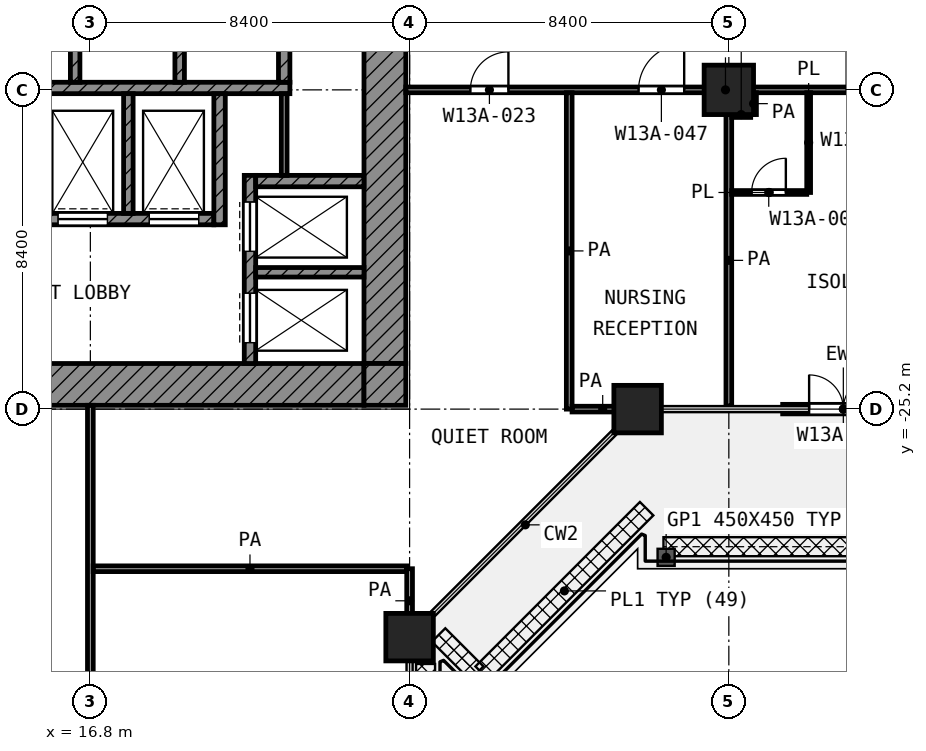
"""IFC4 building model, lengths in metres.
Left out: names, types, materials, properties, quantities, classifications, styles, units other than length and angle.
Written with IfcOpenShell. Run it as: python <this file> out.ifc"""

import sys

from ifc_helpers import new_model, si_unit, direction, frame, frame_2d, origin, origin_2d, place, context, subcontext, project, spatial, rectangle, extrude, element, fill, save


model = new_model("IFC4")
c1 = context("Model", 3, precision=1e-05, world=origin(), true_north=direction((0.0, 1.0)))
c2 = subcontext(c1, "Body", "Model", "MODEL_VIEW")
j1 = project(units=[si_unit("LENGTHUNIT", "METRE"), si_unit("PLANEANGLEUNIT", "RADIAN")], contexts=[c1])
p1 = place(None, origin())
s1 = spatial("IfcSite", under=j1, at=p1, CompositionType="ELEMENT")
p2 = place(p1, origin())
s2 = spatial("IfcBuilding", under=s1, at=p2, CompositionType="ELEMENT")
p3 = place(p2, frame((0.0, 0.0, 60.2)))
s3 = spatial("IfcBuildingStorey", under=s2, at=p3, CompositionType="ELEMENT", Elevation=60.2)
p4 = place(p3, frame((33.6, -16.8, 0.0), z_axis=(0.0, 0.0, 1.0), x_axis=(1.0, 0.0, 0.0)))
e1 = element("IfcColumn", 1, at=p4, inside=s3, PredefinedType="COLUMN", context=c2, shape_type="SweptSolid", body=[
    extrude(rectangle(XDim=1.3, YDim=1.3, at=origin_2d()), origin(), (0.0, 0.0, 1.0), 4.2),
])
for number, where, z_axis, x_axis in (
    (2, (31.2, -25.2, 0.0), (0.0, 0.0, 1.0), (1.0, 0.0, 0.0)),
    (3, (25.2, -31.2, 0.0), (0.0, 0.0, 1.0), (1.0, 0.0, 0.0)),
):
    element("IfcColumn", number, at=place(p3, frame(where, z_axis=z_axis, x_axis=x_axis)), inside=s3, PredefinedType="COLUMN", context=c2, shape_type="SweptSolid", body=[
        extrude(rectangle(XDim=1.25, YDim=1.25, at=origin_2d()), origin(), (0.0, 0.0, 1.0), 4.2),
    ])
p5 = place(p3, frame((35.017, -25.2, 0.0), z_axis=(0.0, 0.0, 1.0), x_axis=(1.0, 0.0, 0.0)))
e4 = element("IfcWall", 4, at=p5, inside=s3, PredefinedType="SOLIDWALL", context=c2, shape_type="SweptSolid", body=[
    extrude(rectangle(XDim=3.192, YDim=0.25, at=frame_2d((1.596, 0.0))), origin(), (0.0, 0.0, 1.0), 3.78),
])
p6 = place(p5, frame((0.696, 0.0, 0.0)))
e5 = element("IfcOpeningElement", 5, at=p6, cuts=e4, PredefinedType="OPENING", context=c2, shape_type="SweptSolid", body=[
    extrude(rectangle(XDim=1.8, YDim=2.1, at=frame_2d((0.9, 1.05))), frame((0.0, 0.135, 0.0), z_axis=(0.0, -1.0, 0.0), x_axis=(1.0, 0.0, 0.0)), (0.0, 0.0, 1.0), 0.27),
])
p7 = place(p3, frame((24.55, -24.0, 0.0), z_axis=(0.0, 0.0, 1.0), x_axis=(0.0, 1.0, 0.0)))
e6 = element("IfcWall", 6, at=p7, inside=s3, PredefinedType="SHEAR", context=c2, shape_type="SweptSolid", body=[
    extrude(rectangle(XDim=18.6, YDim=1.1, at=frame_2d((9.3, 0.0))), origin(), (0.0, 0.0, 1.0), 3.9),
])
p8 = place(p7, frame((10.5, 0.0, 0.0)))
e7 = element("IfcOpeningElement", 7, at=p8, cuts=e6, PredefinedType="OPENING", context=c2, shape_type="SweptSolid", body=[
    extrude(rectangle(XDim=1.8, YDim=2.1, at=frame_2d((0.9, 1.05))), frame((0.0, 0.56, 0.0), z_axis=(0.0, -1.0, 0.0), x_axis=(1.0, 0.0, 0.0)), (0.0, 0.0, 1.0), 1.12),
])
p9 = place(p3, frame((5.4, -24.55, 0.0), z_axis=(0.0, 0.0, 1.0), x_axis=(1.0, 0.0, 0.0)))
e8 = element("IfcWall", 8, at=p9, inside=s3, PredefinedType="SHEAR", context=c2, shape_type="SweptSolid", body=[
    extrude(rectangle(XDim=18.6, YDim=1.1, at=frame_2d((9.3, 0.0))), origin(), (0.0, 0.0, 1.0), 3.9),
])
p10 = place(p9, frame((6.3, 0.0, 0.0)))
e9 = element("IfcOpeningElement", 9, at=p10, cuts=e8, PredefinedType="OPENING", context=c2, shape_type="SweptSolid", body=[
    extrude(rectangle(XDim=1.8, YDim=2.1, at=frame_2d((0.9, 1.05))), frame((0.0, 0.56, 0.0), z_axis=(0.0, -1.0, 0.0), x_axis=(1.0, 0.0, 0.0)), (0.0, 0.0, 1.0), 1.12),
])
p11 = place(p3, frame((24.55, -25.1, 0.0), z_axis=(0.0, 0.0, 1.0), x_axis=(0.0, 1.0, 0.0)))
e10 = element("IfcWall", 10, at=p11, inside=s3, PredefinedType="SHEAR", context=c2, shape_type="SweptSolid", body=[
    extrude(rectangle(XDim=1.1, YDim=1.1, at=frame_2d((0.55, 0.0))), origin(), (0.0, 0.0, 1.0), 3.9),
])
p12 = place(p3, frame((5.4, -16.75, 0.0), z_axis=(0.0, 0.0, 1.0), x_axis=(1.0, 0.0, 0.0)))
e11 = element("IfcWall", 11, at=p12, inside=s3, PredefinedType="SHEAR", context=c2, shape_type="SweptSolid", body=[
    extrude(rectangle(XDim=16.65, YDim=0.3, at=frame_2d((8.325, 0.0))), origin(), (0.0, 0.0, 1.0), 3.9),
])
p13 = place(p3, frame((5.4, -20.2, 0.0), z_axis=(0.0, 0.0, 1.0), x_axis=(1.0, 0.0, 0.0)))
e12 = element("IfcWall", 12, at=p13, inside=s3, PredefinedType="SHEAR", context=c2, shape_type="SweptSolid", body=[
    extrude(rectangle(XDim=14.65, YDim=0.3, at=frame_2d((7.325, 0.0))), origin(), (0.0, 0.0, 1.0), 3.9),
])
p14 = place(p13, frame((10.55, 0.0, 0.0)))
e13 = element("IfcOpeningElement", 13, at=p14, cuts=e12, PredefinedType="OPENING", context=c2, shape_type="SweptSolid", body=[
    extrude(rectangle(XDim=1.3, YDim=2.1, at=frame_2d((0.65, 1.05))), frame((0.0, 0.16, 0.0), z_axis=(0.0, -1.0, 0.0), x_axis=(1.0, 0.0, 0.0)), (0.0, 0.0, 1.0), 0.32),
])
p15 = place(p13, frame((12.95, 0.0, 0.0)))
e14 = element("IfcOpeningElement", 14, at=p15, cuts=e12, PredefinedType="OPENING", context=c2, shape_type="SweptSolid", body=[
    extrude(rectangle(XDim=1.3, YDim=2.1, at=frame_2d((0.65, 1.05))), frame((0.0, 0.16, 0.0), z_axis=(0.0, -1.0, 0.0), x_axis=(1.0, 0.0, 0.0)), (0.0, 0.0, 1.0), 0.32),
])
p16 = place(p13, frame((0.55, 0.0, 0.0)))
e15 = element("IfcOpeningElement", 15, at=p16, cuts=e12, PredefinedType="OPENING", context=c2, shape_type="SweptSolid", body=[
    extrude(rectangle(XDim=1.3, YDim=2.1, at=frame_2d((0.65, 1.05))), frame((0.0, 0.16, 0.0), z_axis=(0.0, -1.0, 0.0), x_axis=(1.0, 0.0, 0.0)), (0.0, 0.0, 1.0), 0.32),
])
p17 = place(p13, frame((2.95, 0.0, 0.0)))
e16 = element("IfcOpeningElement", 16, at=p17, cuts=e12, PredefinedType="OPENING", context=c2, shape_type="SweptSolid", body=[
    extrude(rectangle(XDim=1.3, YDim=2.1, at=frame_2d((0.65, 1.05))), frame((0.0, 0.16, 0.0), z_axis=(0.0, -1.0, 0.0), x_axis=(1.0, 0.0, 0.0)), (0.0, 0.0, 1.0), 0.32),
])
p18 = place(p13, frame((7.15, 0.0, 0.0)))
e17 = element("IfcOpeningElement", 17, at=p18, cuts=e12, PredefinedType="OPENING", context=c2, shape_type="SweptSolid", body=[
    extrude(rectangle(XDim=0.9, YDim=2.1, at=frame_2d((0.45, 1.05))), frame((0.0, 0.16, 0.0), z_axis=(0.0, -1.0, 0.0), x_axis=(1.0, 0.0, 0.0)), (0.0, 0.0, 1.0), 0.32),
])
p19 = place(p3, frame((20.2, -20.35, 0.0), z_axis=(0.0, 0.0, 1.0), x_axis=(0.0, 1.0, 0.0)))
e18 = element("IfcWall", 18, at=p19, inside=s3, PredefinedType="SHEAR", context=c2, shape_type="SweptSolid", body=[
    extrude(rectangle(XDim=3.45, YDim=0.3, at=frame_2d((1.725, 0.0))), origin(), (0.0, 0.0, 1.0), 3.9),
])
p20 = place(p3, frame((21.9, -16.6, 0.0), z_axis=(0.0, 0.0, 1.0), x_axis=(0.0, 1.0, 0.0)))
e19 = element("IfcWall", 19, at=p20, inside=s3, PredefinedType="SHEAR", context=c2, shape_type="SweptSolid", body=[
    extrude(rectangle(XDim=2.35, YDim=0.3, at=frame_2d((1.175, 0.0))), origin(), (0.0, 0.0, 1.0), 3.9),
])
p21 = place(p3, frame((21.15, -19.2, 0.0), z_axis=(0.0, 0.0, 1.0), x_axis=(1.0, 0.0, 0.0)))
e20 = element("IfcWall", 20, at=p21, inside=s3, PredefinedType="SHEAR", context=c2, shape_type="SweptSolid", body=[
    extrude(rectangle(XDim=2.85, YDim=0.3, at=frame_2d((1.425, 0.0))), origin(), (0.0, 0.0, 1.0), 3.9),
])
p22 = place(p3, frame((21.0, -24.0, 0.0), z_axis=(0.0, 0.0, 1.0), x_axis=(0.0, 1.0, 0.0)))
e21 = element("IfcWall", 21, at=p22, inside=s3, PredefinedType="SHEAR", context=c2, shape_type="SweptSolid", body=[
    extrude(rectangle(XDim=4.95, YDim=0.3, at=frame_2d((2.475, 0.0))), origin(), (0.0, 0.0, 1.0), 3.9),
])
p23 = place(p22, frame((2.95, 0.0, 0.0)))
e22 = element("IfcOpeningElement", 22, at=p23, cuts=e21, PredefinedType="OPENING", context=c2, shape_type="SweptSolid", body=[
    extrude(rectangle(XDim=1.3, YDim=2.1, at=frame_2d((0.65, 1.05))), frame((0.0, 0.16, 0.0), z_axis=(0.0, -1.0, 0.0), x_axis=(1.0, 0.0, 0.0)), (0.0, 0.0, 1.0), 0.32),
])
p24 = place(p22, frame((0.55, 0.0, 0.0)))
e23 = element("IfcOpeningElement", 23, at=p24, cuts=e21, PredefinedType="OPENING", context=c2, shape_type="SweptSolid", body=[
    extrude(rectangle(XDim=1.3, YDim=2.1, at=frame_2d((0.65, 1.05))), frame((0.0, 0.16, 0.0), z_axis=(0.0, -1.0, 0.0), x_axis=(1.0, 0.0, 0.0)), (0.0, 0.0, 1.0), 0.32),
])
p25 = place(p3, frame((21.15, -21.6, 0.0), z_axis=(0.0, 0.0, 1.0), x_axis=(1.0, 0.0, 0.0)))
e24 = element("IfcWall", 24, at=p25, inside=s3, PredefinedType="SHEAR", context=c2, shape_type="SweptSolid", body=[
    extrude(rectangle(XDim=2.85, YDim=0.25, at=frame_2d((1.425, 0.0))), origin(), (0.0, 0.0, 1.0), 3.9),
])
p26 = place(p3, frame((17.8, -20.05, 0.0), z_axis=(0.0, 0.0, 1.0), x_axis=(0.0, 1.0, 0.0)))
e25 = element("IfcWall", 25, at=p26, inside=s3, PredefinedType="SHEAR", context=c2, shape_type="SweptSolid", body=[
    extrude(rectangle(XDim=3.15, YDim=0.25, at=frame_2d((1.575, 0.0))), origin(), (0.0, 0.0, 1.0), 3.9),
])
for number, where, z_axis, x_axis in (
    (26, (16.4, -16.6, 0.0), (0.0, 0.0, 1.0), (0.0, 1.0, 0.0)),
    (27, (19.15, -16.6, 0.0), (0.0, 0.0, 1.0), (0.0, 1.0, 0.0)),
):
    element("IfcWall", number, at=place(p3, frame(where, z_axis=z_axis, x_axis=x_axis)), inside=s3, PredefinedType="SHEAR", context=c2, shape_type="SweptSolid", body=[
        extrude(rectangle(XDim=2.35, YDim=0.25, at=frame_2d((1.175, 0.0))), origin(), (0.0, 0.0, 1.0), 3.9),
    ])
p27 = place(p3, frame((21.9, -19.05, 0.0), z_axis=(0.0, 0.0, 1.0), x_axis=(0.0, 1.0, 0.0)))
e28 = element("IfcWall", 28, at=p27, inside=s3, PredefinedType="PARTITIONING", context=c2, shape_type="SweptSolid", body=[
    extrude(rectangle(XDim=2.15, YDim=0.15, at=frame_2d((1.075, 0.0))), origin(), (0.0, 0.0, 1.0), 3.9),
])
p28 = place(p3, frame((33.675, -19.5, 0.0), z_axis=(0.0, 0.0, 1.0), x_axis=(1.0, 0.0, 0.0)))
e29 = element("IfcWall", 29, at=p28, inside=s3, PredefinedType="PARTITIONING", context=c2, shape_type="SweptSolid", body=[
    extrude(rectangle(XDim=1.975, YDim=0.1, at=frame_2d((0.987, 0.0))), origin(), (0.0, 0.0, 1.0), 3.9),
])
p29 = place(p28, frame((0.525, 0.0, 0.0)))
e30 = element("IfcOpeningElement", 30, at=p29, cuts=e29, PredefinedType="OPENING", context=c2, shape_type="SweptSolid", body=[
    extrude(rectangle(XDim=0.9, YDim=2.1, at=frame_2d((0.45, 1.05))), frame((0.0, 0.06, 0.0), z_axis=(0.0, -1.0, 0.0), x_axis=(1.0, 0.0, 0.0)), (0.0, 0.0, 1.0), 0.12),
])
p30 = place(p3, frame((35.7, -19.5, 0.0), z_axis=(0.0, 0.0, 1.0), x_axis=(0.0, 1.0, 0.0)))
e31 = element("IfcWall", 31, at=p30, inside=s3, PredefinedType="PARTITIONING", context=c2, shape_type="SweptSolid", body=[
    extrude(rectangle(XDim=2.625, YDim=0.1, at=frame_2d((1.312, 0.0))), origin(), (0.0, 0.0, 1.0), 3.9),
])
p31 = place(p3, frame((16.875, -29.4, 0.0), z_axis=(0.0, 0.0, 1.0), x_axis=(1.0, 0.0, 0.0)))
e32 = element("IfcWall", 32, at=p31, inside=s3, PredefinedType="PARTITIONING", context=c2, shape_type="SweptSolid", body=[
    extrude(rectangle(XDim=8.25, YDim=0.15, at=frame_2d((4.125, 0.0))), origin(), (0.0, 0.0, 1.0), 3.9),
])
p32 = place(p3, frame((29.475, -25.2, 0.0), z_axis=(0.0, 0.0, 1.0), x_axis=(1.0, 0.0, 0.0)))
e33 = element("IfcWall", 33, at=p32, inside=s3, PredefinedType="PARTITIONING", context=c2, shape_type="SweptSolid", body=[
    extrude(rectangle(XDim=1.612, YDim=0.15, at=frame_2d((0.806, 0.0))), origin(), (0.0, 0.0, 1.0), 3.9),
])
p33 = place(p3, frame((33.677, -17.45, 0.0), z_axis=(0.0, 0.0, 1.0), x_axis=(1.0, 0.0, 0.0)))
e34 = element("IfcWall", 34, at=p33, inside=s3, PredefinedType="PARTITIONING", context=c2, shape_type="SweptSolid", body=[
    extrude(rectangle(XDim=0.498, YDim=0.15, at=frame_2d((0.249, 0.0))), origin(), (0.0, 0.0, 1.0), 3.9),
])
p34 = place(p3, frame((25.1, -16.8, 0.0), z_axis=(0.0, 0.0, 1.0), x_axis=(1.0, 0.0, 0.0)))
e35 = element("IfcWall", 35, at=p34, inside=s3, PredefinedType="PARTITIONING", context=c2, shape_type="SweptSolid", body=[
    extrude(rectangle(XDim=16.823, YDim=0.15, at=frame_2d((8.412, 0.0))), origin(), (0.0, 0.0, 1.0), 3.9),
])
p35 = place(p34, frame((1.7, 0.0, 0.0)))
e36 = element("IfcOpeningElement", 36, at=p35, cuts=e35, PredefinedType="OPENING", context=c2, shape_type="SweptSolid", body=[
    extrude(rectangle(XDim=1.0, YDim=2.1, at=frame_2d((0.5, 1.05))), frame((0.0, 0.085, 0.0), z_axis=(0.0, -1.0, 0.0), x_axis=(1.0, 0.0, 0.0)), (0.0, 0.0, 1.0), 0.17),
])
p36 = place(p34, frame((6.125, 0.0, 0.0)))
e37 = element("IfcOpeningElement", 37, at=p36, cuts=e35, PredefinedType="OPENING", context=c2, shape_type="SweptSolid", body=[
    extrude(rectangle(XDim=1.2, YDim=2.1, at=frame_2d((0.6, 1.05))), frame((0.0, 0.085, 0.0), z_axis=(0.0, -1.0, 0.0), x_axis=(1.0, 0.0, 0.0)), (0.0, 0.0, 1.0), 0.17),
])
p37 = place(p34, frame((13.15, 0.0, 0.0)))
e38 = element("IfcOpeningElement", 38, at=p37, cuts=e35, PredefinedType="OPENING", context=c2, shape_type="SweptSolid", body=[
    extrude(rectangle(XDim=1.2, YDim=2.1, at=frame_2d((0.6, 1.05))), frame((0.0, 0.085, 0.0), z_axis=(0.0, -1.0, 0.0), x_axis=(1.0, 0.0, 0.0)), (0.0, 0.0, 1.0), 0.17),
])
p38 = place(p34, frame((11.6, 0.0, 0.0)))
e39 = element("IfcOpeningElement", 39, at=p38, cuts=e35, PredefinedType="OPENING", context=c2, shape_type="SweptSolid", body=[
    extrude(rectangle(XDim=1.2, YDim=2.1, at=frame_2d((0.6, 1.05))), frame((0.0, 0.085, 0.0), z_axis=(0.0, -1.0, 0.0), x_axis=(1.0, 0.0, 0.0)), (0.0, 0.0, 1.0), 0.17),
])
p39 = place(p34, frame((15.0, 0.0, 0.0)))
e40 = element("IfcOpeningElement", 40, at=p39, cuts=e35, PredefinedType="OPENING", context=c2, shape_type="SweptSolid", body=[
    extrude(rectangle(XDim=1.2, YDim=2.1, at=frame_2d((0.6, 1.05))), frame((0.0, 0.085, 0.0), z_axis=(0.0, -1.0, 0.0), x_axis=(1.0, 0.0, 0.0)), (0.0, 0.0, 1.0), 0.17),
])
p40 = place(p3, frame((16.8, -58.798, 0.0), z_axis=(0.0, 0.0, 1.0), x_axis=(0.0, 1.0, 0.0)))
e41 = element("IfcWall", 41, at=p40, inside=s3, PredefinedType="PARTITIONING", context=c2, shape_type="SweptSolid", body=[
    extrude(rectangle(XDim=33.698, YDim=0.15, at=frame_2d((16.849, 0.0))), origin(), (0.0, 0.0, 1.0), 3.9),
])
p41 = place(p40, frame((23.298, 0.0, 0.0)))
e42 = element("IfcOpeningElement", 42, at=p41, cuts=e41, PredefinedType="OPENING", context=c2, shape_type="SweptSolid", body=[
    extrude(rectangle(XDim=1.2, YDim=2.1, at=frame_2d((0.6, 1.05))), frame((0.0, 0.085, 0.0), z_axis=(0.0, -1.0, 0.0), x_axis=(1.0, 0.0, 0.0)), (0.0, 0.0, 1.0), 0.17),
])
p42 = place(p40, frame((15.223, 0.0, 0.0)))
e43 = element("IfcOpeningElement", 43, at=p42, cuts=e41, PredefinedType="OPENING", context=c2, shape_type="SweptSolid", body=[
    extrude(rectangle(XDim=0.9, YDim=2.1, at=frame_2d((0.45, 1.05))), frame((0.0, 0.085, 0.0), z_axis=(0.0, -1.0, 0.0), x_axis=(1.0, 0.0, 0.0)), (0.0, 0.0, 1.0), 0.17),
])
p43 = place(p40, frame((13.348, 0.0, 0.0)))
e44 = element("IfcOpeningElement", 44, at=p43, cuts=e41, PredefinedType="OPENING", context=c2, shape_type="SweptSolid", body=[
    extrude(rectangle(XDim=1.2, YDim=2.1, at=frame_2d((0.6, 1.05))), frame((0.0, 0.085, 0.0), z_axis=(0.0, -1.0, 0.0), x_axis=(1.0, 0.0, 0.0)), (0.0, 0.0, 1.0), 0.17),
])
p44 = place(p40, frame((9.098, 0.0, 0.0)))
e45 = element("IfcOpeningElement", 45, at=p44, cuts=e41, PredefinedType="OPENING", context=c2, shape_type="SweptSolid", body=[
    extrude(rectangle(XDim=1.2, YDim=2.1, at=frame_2d((0.6, 1.05))), frame((0.0, 0.085, 0.0), z_axis=(0.0, -1.0, 0.0), x_axis=(1.0, 0.0, 0.0)), (0.0, 0.0, 1.0), 0.17),
])
p45 = place(p40, frame((6.498, 0.0, 0.0)))
e46 = element("IfcOpeningElement", 46, at=p45, cuts=e41, PredefinedType="OPENING", context=c2, shape_type="SweptSolid", body=[
    extrude(rectangle(XDim=1.2, YDim=2.1, at=frame_2d((0.6, 1.05))), frame((0.0, 0.085, 0.0), z_axis=(0.0, -1.0, 0.0), x_axis=(1.0, 0.0, 0.0)), (0.0, 0.0, 1.0), 0.17),
])
p46 = place(p40, frame((4.348, 0.0, 0.0)))
e47 = element("IfcOpeningElement", 47, at=p46, cuts=e41, PredefinedType="OPENING", context=c2, shape_type="SweptSolid", body=[
    extrude(rectangle(XDim=1.2, YDim=2.1, at=frame_2d((0.6, 1.05))), frame((0.0, 0.085, 0.0), z_axis=(0.0, -1.0, 0.0), x_axis=(1.0, 0.0, 0.0)), (0.0, 0.0, 1.0), 0.17),
])
p47 = place(p40, frame((0.698, 0.0, 0.0)))
e48 = element("IfcOpeningElement", 48, at=p47, cuts=e41, PredefinedType="OPENING", context=c2, shape_type="SweptSolid", body=[
    extrude(rectangle(XDim=0.9, YDim=2.1, at=frame_2d((0.45, 1.05))), frame((0.0, 0.085, 0.0), z_axis=(0.0, -1.0, 0.0), x_axis=(1.0, 0.0, 0.0)), (0.0, 0.0, 1.0), 0.17),
])
p48 = place(p3, frame((25.2, -31.087, 0.0), z_axis=(0.0, 0.0, 1.0), x_axis=(0.0, 1.0, 0.0)))
e49 = element("IfcWall", 49, at=p48, inside=s3, PredefinedType="PARTITIONING", context=c2, shape_type="SweptSolid", body=[
    extrude(rectangle(XDim=1.687, YDim=0.15, at=frame_2d((0.844, 0.0))), origin(), (0.0, 0.0, 1.0), 3.9),
])
p49 = place(p3, frame((29.4, -25.2, 0.0), z_axis=(0.0, 0.0, 1.0), x_axis=(0.0, 1.0, 0.0)))
e50 = element("IfcWall", 50, at=p49, inside=s3, PredefinedType="PARTITIONING", context=c2, shape_type="SweptSolid", body=[
    extrude(rectangle(XDim=8.325, YDim=0.15, at=frame_2d((4.163, 0.0))), origin(), (0.0, 0.0, 1.0), 3.9),
])
p50 = place(p3, frame((33.6, -25.12, 0.0), z_axis=(0.0, 0.0, 1.0), x_axis=(0.0, 1.0, 0.0)))
e51 = element("IfcWall", 51, at=p50, inside=s3, PredefinedType="PARTITIONING", context=c2, shape_type="SweptSolid", body=[
    extrude(rectangle(XDim=7.668, YDim=0.15, at=frame_2d((3.834, 0.0))), origin(), (0.0, 0.0, 1.0), 3.9),
])
p51 = place(p3, frame((34.25, -17.45, 0.0), z_axis=(0.0, 0.0, 1.0), x_axis=(0.0, 1.0, 0.0)))
e52 = element("IfcWall", 52, at=p51, inside=s3, PredefinedType="PARTITIONING", context=c2, shape_type="SweptSolid", body=[
    extrude(rectangle(XDim=0.575, YDim=0.15, at=frame_2d((0.288, 0.0))), origin(), (0.0, 0.0, 1.0), 3.9),
])
p52 = place(p6, origin())
e53 = element("IfcDoor", 53, at=p52, inside=s3, OperationType="DOUBLE_DOOR_SINGLE_SWING", PredefinedType="DOOR", context=c2, shape_type="SweptSolid", body=[
    extrude(rectangle(XDim=1.8, YDim=2.1, at=frame_2d((0.9, 1.05))), frame((0.0, 0.025, 0.0), z_axis=(0.0, -1.0, 0.0), x_axis=(1.0, 0.0, 0.0)), (0.0, 0.0, 1.0), 0.05),
])
fill(e5, e53)
p53 = place(p23, origin())
e54 = element("IfcDoor", 54, at=p53, inside=s3, OperationType="DOUBLE_DOOR_SLIDING", PredefinedType="DOOR", context=c2, shape_type="SweptSolid", body=[
    extrude(rectangle(XDim=1.3, YDim=2.1, at=frame_2d((0.65, 1.05))), frame((0.0, 0.025, 0.0), z_axis=(0.0, -1.0, 0.0), x_axis=(1.0, 0.0, 0.0)), (0.0, 0.0, 1.0), 0.05),
])
fill(e22, e54)
p54 = place(p24, origin())
e55 = element("IfcDoor", 55, at=p54, inside=s3, OperationType="DOUBLE_DOOR_SLIDING", PredefinedType="DOOR", context=c2, shape_type="SweptSolid", body=[
    extrude(rectangle(XDim=1.3, YDim=2.1, at=frame_2d((0.65, 1.05))), frame((0.0, 0.025, 0.0), z_axis=(0.0, -1.0, 0.0), x_axis=(1.0, 0.0, 0.0)), (0.0, 0.0, 1.0), 0.05),
])
fill(e23, e55)
p55 = place(p14, origin())
e56 = element("IfcDoor", 56, at=p55, inside=s3, OperationType="DOUBLE_DOOR_SLIDING", PredefinedType="DOOR", context=c2, shape_type="SweptSolid", body=[
    extrude(rectangle(XDim=1.3, YDim=2.1, at=frame_2d((0.65, 1.05))), frame((0.0, 0.025, 0.0), z_axis=(0.0, -1.0, 0.0), x_axis=(1.0, 0.0, 0.0)), (0.0, 0.0, 1.0), 0.05),
])
fill(e13, e56)
p56 = place(p15, origin())
e57 = element("IfcDoor", 57, at=p56, inside=s3, OperationType="DOUBLE_DOOR_SLIDING", PredefinedType="DOOR", context=c2, shape_type="SweptSolid", body=[
    extrude(rectangle(XDim=1.3, YDim=2.1, at=frame_2d((0.65, 1.05))), frame((0.0, 0.025, 0.0), z_axis=(0.0, -1.0, 0.0), x_axis=(1.0, 0.0, 0.0)), (0.0, 0.0, 1.0), 0.05),
])
fill(e14, e57)
p57 = place(p35, origin())
e58 = element("IfcDoor", 58, at=p57, inside=s3, OperationType="SINGLE_SWING_RIGHT", PredefinedType="DOOR", context=c2, shape_type="SweptSolid", body=[
    extrude(rectangle(XDim=1.0, YDim=2.1, at=frame_2d((0.5, 1.05))), frame((0.0, 0.025, 0.0), z_axis=(0.0, -1.0, 0.0), x_axis=(1.0, 0.0, 0.0)), (0.0, 0.0, 1.0), 0.05),
])
fill(e36, e58)
p58 = place(p36, origin())
e59 = element("IfcDoor", 59, at=p58, inside=s3, OperationType="SINGLE_SWING_RIGHT", PredefinedType="DOOR", context=c2, shape_type="SweptSolid", body=[
    extrude(rectangle(XDim=1.2, YDim=2.1, at=frame_2d((0.6, 1.05))), frame((0.0, 0.025, 0.0), z_axis=(0.0, -1.0, 0.0), x_axis=(1.0, 0.0, 0.0)), (0.0, 0.0, 1.0), 0.05),
])
fill(e37, e59)
p59 = place(p29, origin())
e60 = element("IfcDoor", 60, at=p59, inside=s3, OperationType="SINGLE_SWING_RIGHT", PredefinedType="DOOR", context=c2, shape_type="SweptSolid", body=[
    extrude(rectangle(XDim=0.9, YDim=2.1, at=frame_2d((0.45, 1.05))), frame((0.0, 0.025, 0.0), z_axis=(0.0, -1.0, 0.0), x_axis=(1.0, 0.0, 0.0)), (0.0, 0.0, 1.0), 0.05),
])
fill(e30, e60)
save(model, sys.argv[1])
